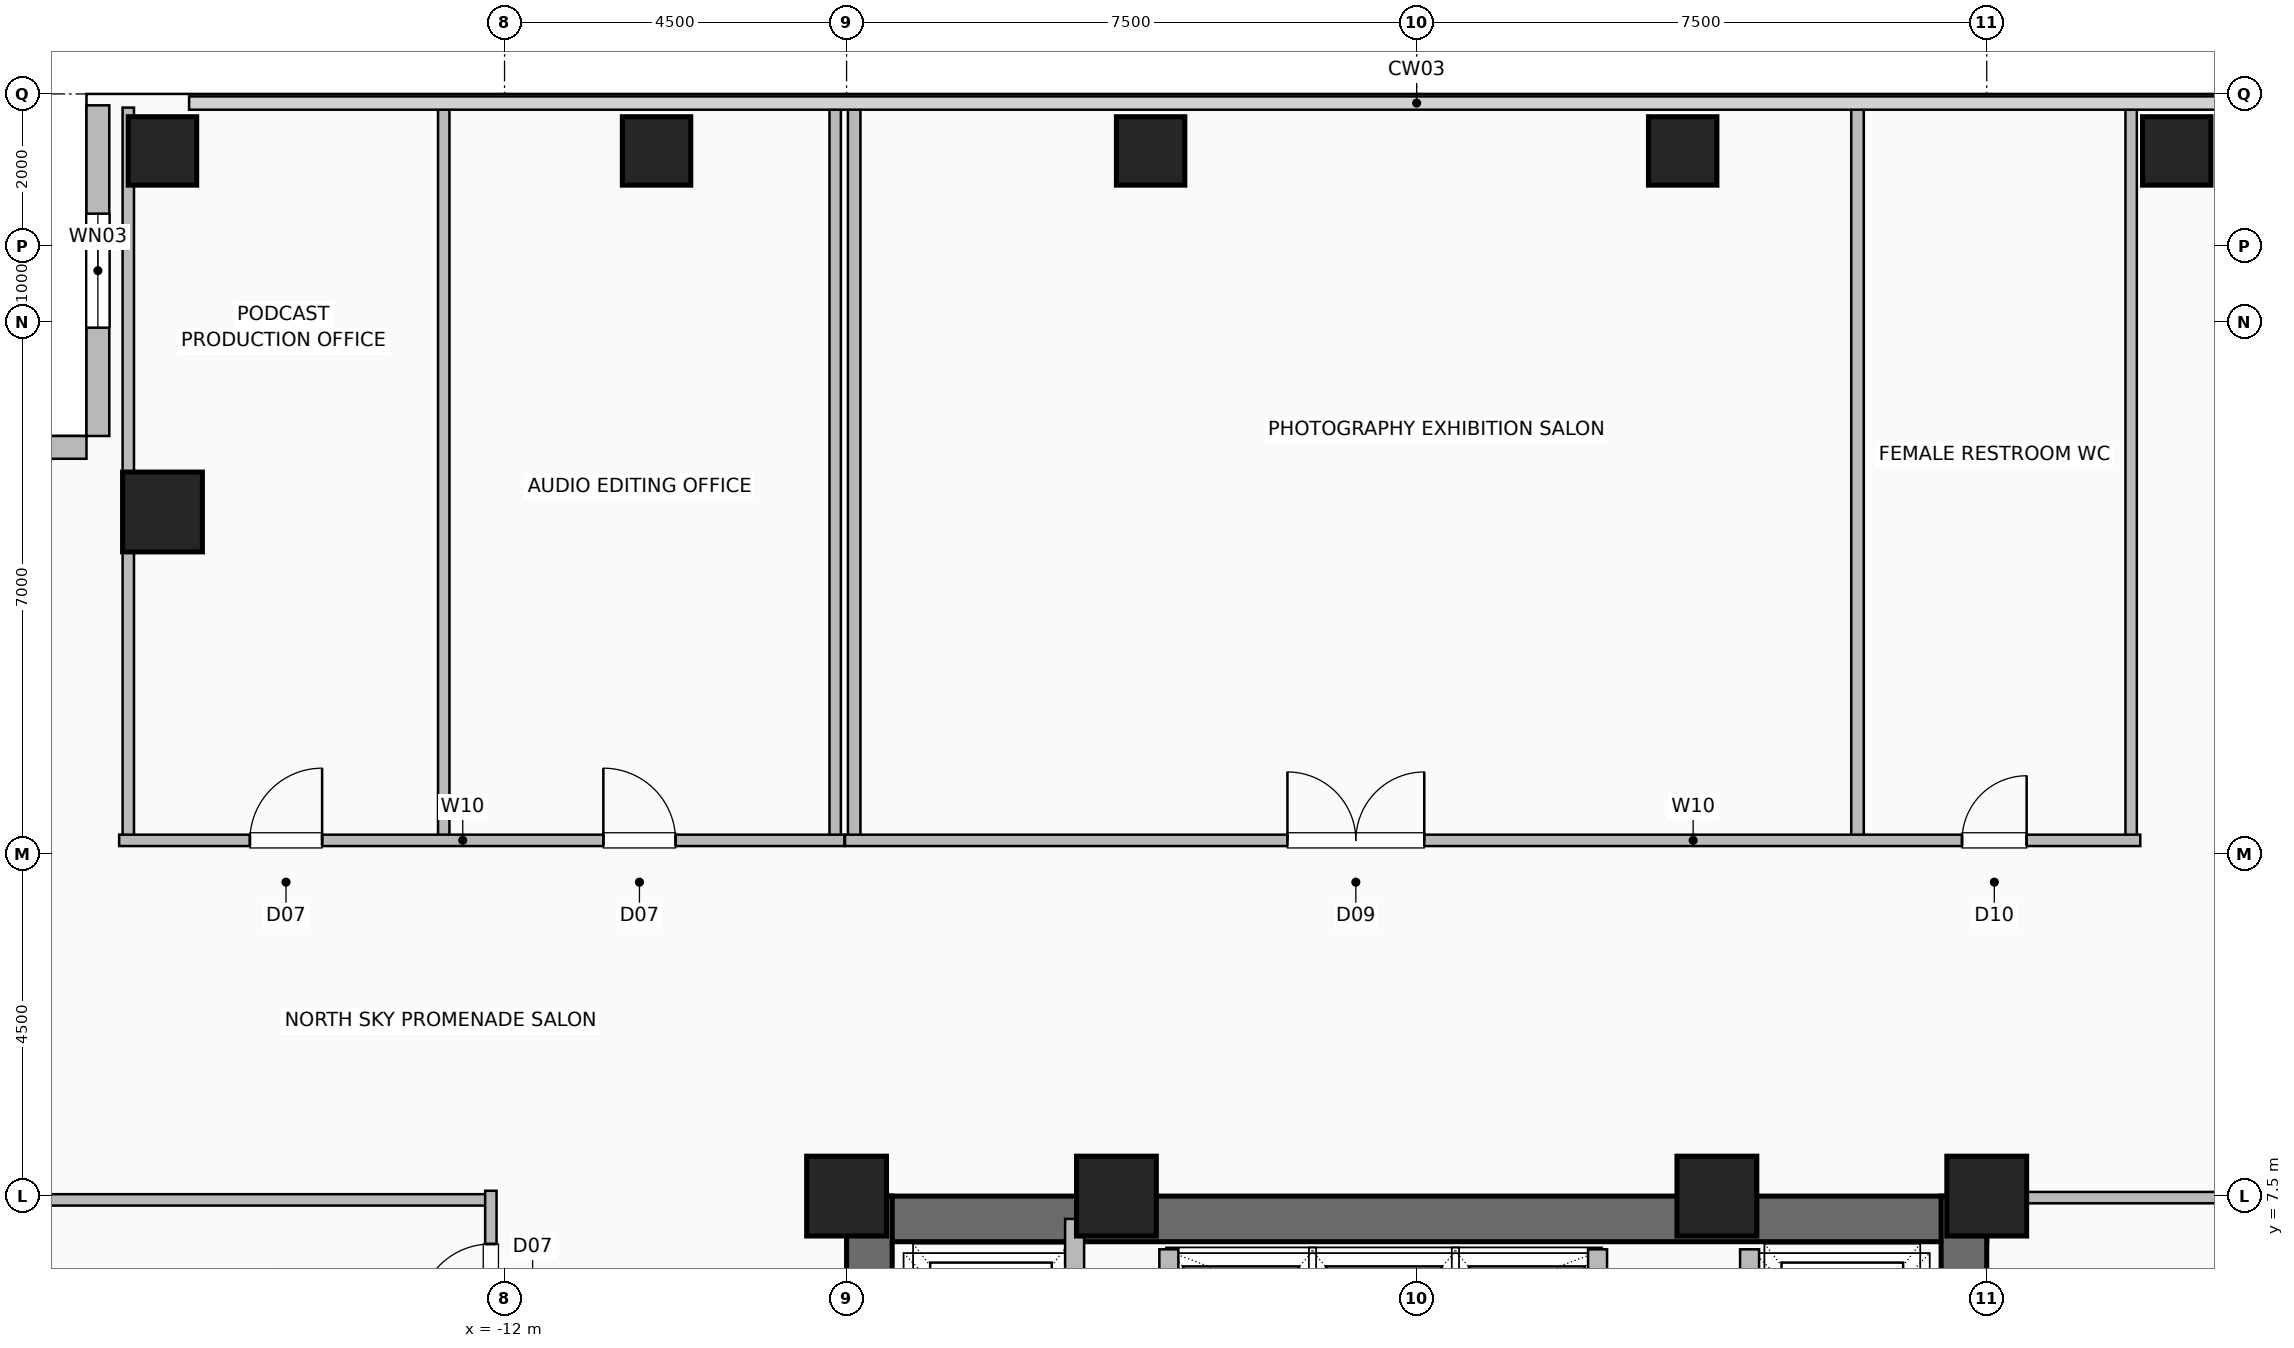
"""IFC4 building model, lengths in metres.
Left out: names, types, materials, properties, quantities, classifications, styles, units other than length and angle.
Written with IfcOpenShell. Run it as: python <this file> out.ifc"""

import sys

from ifc_helpers import new_model, si_unit, direction, frame, frame_2d, origin, origin_2d, place, context, subcontext, project, spatial, rectangle, hollow_rectangle, extrude, element, fill, save


model = new_model("IFC4")
c1 = context("Model", 3, precision=1e-05, world=origin(), true_north=direction((0.0, 1.0)))
c2 = subcontext(c1, "Body", "Model", "MODEL_VIEW")
j1 = project(units=[si_unit("LENGTHUNIT", "METRE"), si_unit("PLANEANGLEUNIT", "RADIAN")], contexts=[c1])
p1 = place(None, origin())
s1 = spatial("IfcSite", under=j1, at=p1, CompositionType="ELEMENT")
p2 = place(p1, origin())
s2 = spatial("IfcBuilding", under=s1, at=p2, CompositionType="ELEMENT")
p3 = place(p2, frame((0.0, 0.0, 140.8)))
s3 = spatial("IfcBuildingStorey", under=s2, at=p3, CompositionType="ELEMENT", Elevation=140.8)
for number, where, z_axis, x_axis in (
    (1, (7.5, 7.5, 0.0), (0.0, 0.0, 1.0), (1.0, 0.0, 0.0)),
    (2, (3.95, 7.5, 0.0), (0.0, 0.0, 1.0), (1.0, 0.0, 0.0)),
    (3, (-3.95, 7.5, 0.0), (0.0, 0.0, 1.0), (1.0, 0.0, 0.0)),
    (4, (-7.5, 7.5, 0.0), (0.0, 0.0, 1.0), (1.0, 0.0, 0.0)),
):
    element("IfcColumn", number, at=place(p3, frame(where, z_axis=z_axis, x_axis=x_axis)), inside=s3, PredefinedType="COLUMN", context=c2, shape_type="SweptSolid", body=[
        extrude(hollow_rectangle(XDim=1.05, YDim=1.05, WallThickness=0.05, at=origin_2d()), origin(), (0.0, 0.0, 1.0), 3.6),
    ])
for number, where, z_axis, x_axis in (
    (5, (-16.5, 21.25, 0.0), (0.0, 0.0, 1.0), (1.0, 0.0, 0.0)),
    (6, (-10.0, 21.25, 0.0), (0.0, 0.0, 1.0), (1.0, 0.0, 0.0)),
    (7, (-3.5, 21.25, 0.0), (0.0, 0.0, 1.0), (1.0, 0.0, 0.0)),
    (8, (3.5, 21.25, 0.0), (0.0, 0.0, 1.0), (1.0, 0.0, 0.0)),
    (9, (10.0, 21.25, 0.0), (0.0, 0.0, 1.0), (1.0, 0.0, 0.0)),
):
    element("IfcColumn", number, at=place(p3, frame(where, z_axis=z_axis, x_axis=x_axis)), inside=s3, PredefinedType="COLUMN", context=c2, shape_type="SweptSolid", body=[
        extrude(hollow_rectangle(XDim=0.9, YDim=0.9, WallThickness=0.045, at=origin_2d()), origin(), (0.0, 0.0, 1.0), 3.6),
    ])
p4 = place(p3, frame((-16.5, 16.5, 0.0), z_axis=(0.0, 0.0, 1.0), x_axis=(1.0, 0.0, 0.0)))
e10 = element("IfcColumn", 10, at=p4, inside=s3, PredefinedType="COLUMN", context=c2, shape_type="SweptSolid", body=[
    extrude(hollow_rectangle(XDim=1.05, YDim=1.05, WallThickness=0.05, at=origin_2d()), origin(), (0.0, 0.0, 1.0), 3.6),
])
p5 = place(p3, frame((-17.35, 21.85, 0.0), z_axis=(0.0, 0.0, 1.0), x_axis=(0.0, -1.0, 0.0)))
e11 = element("IfcWall", 11, at=p5, inside=s3, PredefinedType="SOLIDWALL", context=c2, shape_type="SweptSolid", body=[
    extrude(rectangle(XDim=4.35, YDim=0.3, at=frame_2d((2.175, 0.0))), origin(), (0.0, 0.0, 1.0), 3.36),
])
p6 = place(p5, frame((1.425, 0.0, 0.9)))
e12 = element("IfcOpeningElement", 12, at=p6, cuts=e11, PredefinedType="OPENING", context=c2, shape_type="SweptSolid", body=[
    extrude(rectangle(XDim=1.5, YDim=1.8, at=frame_2d((0.75, 0.9))), frame((0.0, 0.16, 0.0), z_axis=(0.0, -1.0, 0.0), x_axis=(1.0, 0.0, 0.0)), (0.0, 0.0, 1.0), 0.32),
])
p7 = place(p3, frame((-21.85, 17.35, 0.0), z_axis=(0.0, 0.0, 1.0), x_axis=(1.0, 0.0, 0.0)))
e13 = element("IfcWall", 13, at=p7, inside=s3, PredefinedType="SOLIDWALL", context=c2, shape_type="SweptSolid", body=[
    extrude(rectangle(XDim=4.35, YDim=0.3, at=frame_2d((2.175, 0.0))), origin(), (0.0, 0.0, 1.0), 3.36),
])
p8 = place(p3, frame((-7.5, 7.2, 0.0), z_axis=(0.0, 0.0, 1.0), x_axis=(1.0, 0.0, 0.0)))
e14 = element("IfcWall", 14, at=p8, inside=s3, PredefinedType="SHEAR", context=c2, shape_type="SweptSolid", body=[
    extrude(rectangle(XDim=15.0, YDim=0.6, at=frame_2d((7.5, 0.0))), origin(), (0.0, 0.0, 1.0), 3.36),
])
p9 = place(p3, frame((-7.2, -7.5, 0.0), z_axis=(0.0, 0.0, 1.0), x_axis=(0.0, 1.0, 0.0)))
e15 = element("IfcWall", 15, at=p9, inside=s3, PredefinedType="SHEAR", context=c2, shape_type="SweptSolid", body=[
    extrude(rectangle(XDim=15.0, YDim=0.6, at=frame_2d((7.5, 0.0))), origin(), (0.0, 0.0, 1.0), 3.36),
])
p10 = place(p9, frame((9.5, 0.0, 0.0)))
e16 = element("IfcOpeningElement", 16, at=p10, cuts=e15, PredefinedType="OPENING", context=c2, shape_type="SweptSolid", body=[
    extrude(rectangle(XDim=1.0, YDim=2.08, at=frame_2d((0.5, 1.04))), frame((0.0, 0.31, 0.0), z_axis=(0.0, -1.0, 0.0), x_axis=(1.0, 0.0, 0.0)), (0.0, 0.0, 1.0), 0.62),
])
p11 = place(p3, frame((7.2, -7.5, 0.0), z_axis=(0.0, 0.0, 1.0), x_axis=(0.0, 1.0, 0.0)))
e17 = element("IfcWall", 17, at=p11, inside=s3, PredefinedType="SHEAR", context=c2, shape_type="SweptSolid", body=[
    extrude(rectangle(XDim=15.0, YDim=0.6, at=frame_2d((7.5, 0.0))), origin(), (0.0, 0.0, 1.0), 3.36),
])
for number, where, z_axis, x_axis in (
    (18, (-3.26, 4.58, 0.0), (0.0, 0.0, 1.0), (0.0, 1.0, 0.0)),
    (19, (2.38, 4.58, 0.0), (0.0, 0.0, 1.0), (0.0, 1.0, 0.0)),
):
    element("IfcWall", number, at=place(p3, frame(where, z_axis=z_axis, x_axis=x_axis)), inside=s3, PredefinedType="SHEAR", context=c2, shape_type="SweptSolid", body=[
        extrude(rectangle(XDim=2.22, YDim=0.25, at=frame_2d((1.11, 0.0))), origin(), (0.0, 0.0, 1.0), 3.36),
    ])
p12 = place(p3, frame((-4.5, 4.35, 0.0), z_axis=(0.0, 0.0, 1.0), x_axis=(0.0, 1.0, 0.0)))
e20 = element("IfcWall", 20, at=p12, inside=s3, PredefinedType="SHEAR", context=c2, shape_type="SweptSolid", body=[
    extrude(rectangle(XDim=2.85, YDim=0.25, at=frame_2d((1.425, 0.0))), origin(), (0.0, 0.0, 1.0), 3.36),
])
p13 = place(p3, frame((4.38, 4.3, 0.0), z_axis=(0.0, 0.0, 1.0), x_axis=(0.0, 1.0, 0.0)))
e21 = element("IfcWall", 21, at=p13, inside=s3, PredefinedType="SHEAR", context=c2, shape_type="SweptSolid", body=[
    extrude(rectangle(XDim=2.5, YDim=0.25, at=frame_2d((1.25, 0.0))), origin(), (0.0, 0.0, 1.0), 3.36),
])
p14 = place(p13, frame((0.8, 0.0, 0.0)))
e22 = element("IfcOpeningElement", 22, at=p14, cuts=e21, PredefinedType="OPENING", context=c2, shape_type="SweptSolid", body=[
    extrude(rectangle(XDim=1.2, YDim=2.2, at=frame_2d((0.6, 1.1))), frame((0.0, 0.135, 0.0), z_axis=(0.0, -1.0, 0.0), x_axis=(1.0, 0.0, 0.0)), (0.0, 0.0, 1.0), 0.27),
])
p15 = place(p3, frame((-21.82, 7.45, 0.0), z_axis=(0.0, 0.0, 1.0), x_axis=(1.0, 0.0, 0.0)))
e23 = element("IfcWall", 23, at=p15, inside=s3, PredefinedType="PARTITIONING", context=c2, shape_type="SweptSolid", body=[
    extrude(rectangle(XDim=9.64, YDim=0.15, at=frame_2d((4.82, 0.0))), origin(), (0.0, 0.0, 1.0), 3.36),
])
p16 = place(p3, frame((-12.18, -7.57, 0.0), z_axis=(0.0, 0.0, 1.0), x_axis=(0.0, 1.0, 0.0)))
e24 = element("IfcWall", 24, at=p16, inside=s3, PredefinedType="PARTITIONING", context=c2, shape_type="SweptSolid", body=[
    extrude(rectangle(XDim=15.14, YDim=0.15, at=frame_2d((7.57, 0.0))), origin(), (0.0, 0.0, 1.0), 3.36),
])
p17 = place(p16, frame((2.17, 0.0, 0.0)))
e25 = element("IfcOpeningElement", 25, at=p17, cuts=e24, PredefinedType="OPENING", context=c2, shape_type="SweptSolid", body=[
    extrude(rectangle(XDim=0.95, YDim=2.06, at=frame_2d((0.475, 1.03))), frame((0.0, 0.085, 0.0), z_axis=(0.0, -1.0, 0.0), x_axis=(1.0, 0.0, 0.0)), (0.0, 0.0, 1.0), 0.17),
])
p18 = place(p16, frame((7.695, 0.0, 0.0)))
e26 = element("IfcOpeningElement", 26, at=p18, cuts=e24, PredefinedType="OPENING", context=c2, shape_type="SweptSolid", body=[
    extrude(rectangle(XDim=0.95, YDim=2.06, at=frame_2d((0.475, 1.03))), frame((0.0, 0.085, 0.0), z_axis=(0.0, -1.0, 0.0), x_axis=(1.0, 0.0, 0.0)), (0.0, 0.0, 1.0), 0.17),
])
p19 = place(p16, frame((11.615, 0.0, 0.0)))
e27 = element("IfcOpeningElement", 27, at=p19, cuts=e24, PredefinedType="OPENING", context=c2, shape_type="SweptSolid", body=[
    extrude(rectangle(XDim=0.85, YDim=2.05, at=frame_2d((0.425, 1.025))), frame((0.0, 0.085, 0.0), z_axis=(0.0, -1.0, 0.0), x_axis=(1.0, 0.0, 0.0)), (0.0, 0.0, 1.0), 0.17),
])
p20 = place(p16, frame((13.49, 0.0, 0.0)))
e28 = element("IfcOpeningElement", 28, at=p20, cuts=e24, PredefinedType="OPENING", context=c2, shape_type="SweptSolid", body=[
    extrude(rectangle(XDim=0.95, YDim=2.06, at=frame_2d((0.475, 1.03))), frame((0.0, 0.085, 0.0), z_axis=(0.0, -1.0, 0.0), x_axis=(1.0, 0.0, 0.0)), (0.0, 0.0, 1.0), 0.17),
])
for number, where, z_axis, x_axis in (
    (29, (-16.95, 12.18, 0.0), (0.0, 0.0, 1.0), (0.0, 1.0, 0.0)),
    (30, (-12.8, 12.18, 0.0), (0.0, 0.0, 1.0), (0.0, 1.0, 0.0)),
    (31, (-7.65, 12.18, 0.0), (0.0, 0.0, 1.0), (0.0, 1.0, 0.0)),
):
    element("IfcWall", number, at=place(p3, frame(where, z_axis=z_axis, x_axis=x_axis)), inside=s3, PredefinedType="PARTITIONING", context=c2, shape_type="SweptSolid", body=[
        extrude(rectangle(XDim=9.64, YDim=0.15, at=frame_2d((4.82, 0.0))), origin(), (0.0, 0.0, 1.0), 3.36),
    ])
p21 = place(p3, frame((-17.07, 12.18, 0.0), z_axis=(0.0, 0.0, 1.0), x_axis=(1.0, 0.0, 0.0)))
e32 = element("IfcWall", 32, at=p21, inside=s3, PredefinedType="PARTITIONING", context=c2, shape_type="SweptSolid", body=[
    extrude(rectangle(XDim=9.54, YDim=0.15, at=frame_2d((4.77, 0.0))), origin(), (0.0, 0.0, 1.0), 3.36),
])
p22 = place(p21, frame((1.72, 0.0, 0.0)))
e33 = element("IfcOpeningElement", 33, at=p22, cuts=e32, PredefinedType="OPENING", context=c2, shape_type="SweptSolid", body=[
    extrude(rectangle(XDim=0.95, YDim=2.06, at=frame_2d((0.475, 1.03))), frame((0.0, 0.085, 0.0), z_axis=(0.0, -1.0, 0.0), x_axis=(1.0, 0.0, 0.0)), (0.0, 0.0, 1.0), 0.17),
])
p23 = place(p21, frame((6.37, 0.0, 0.0)))
e34 = element("IfcOpeningElement", 34, at=p23, cuts=e32, PredefinedType="OPENING", context=c2, shape_type="SweptSolid", body=[
    extrude(rectangle(XDim=0.95, YDim=2.06, at=frame_2d((0.475, 1.03))), frame((0.0, 0.085, 0.0), z_axis=(0.0, -1.0, 0.0), x_axis=(1.0, 0.0, 0.0)), (0.0, 0.0, 1.0), 0.17),
])
for number, where, z_axis, x_axis in (
    (35, (-7.4, 12.18, 0.0), (0.0, 0.0, 1.0), (0.0, 1.0, 0.0)),
    (36, (5.8, 12.18, 0.0), (0.0, 0.0, 1.0), (0.0, 1.0, 0.0)),
):
    element("IfcWall", number, at=place(p3, frame(where, z_axis=z_axis, x_axis=x_axis)), inside=s3, PredefinedType="PLUMBINGWALL", context=c2, shape_type="SweptSolid", body=[
        extrude(rectangle(XDim=9.64, YDim=0.165, at=frame_2d((4.82, 0.0))), origin(), (0.0, 0.0, 1.0), 3.36),
    ])
p24 = place(p3, frame((9.4, 12.18, 0.0), z_axis=(0.0, 0.0, 1.0), x_axis=(0.0, 1.0, 0.0)))
e37 = element("IfcWall", 37, at=p24, inside=s3, PredefinedType="PARTITIONING", context=c2, shape_type="SweptSolid", body=[
    extrude(rectangle(XDim=9.64, YDim=0.15, at=frame_2d((4.82, 0.0))), origin(), (0.0, 0.0, 1.0), 3.36),
])
p25 = place(p3, frame((-7.52, 12.18, 0.0), z_axis=(0.0, 0.0, 1.0), x_axis=(1.0, 0.0, 0.0)))
e38 = element("IfcWall", 38, at=p25, inside=s3, PredefinedType="PARTITIONING", context=c2, shape_type="SweptSolid", body=[
    extrude(rectangle(XDim=17.04, YDim=0.15, at=frame_2d((8.52, 0.0))), origin(), (0.0, 0.0, 1.0), 3.36),
])
p26 = place(p25, frame((5.82, 0.0, 0.0)))
e39 = element("IfcOpeningElement", 39, at=p26, cuts=e38, PredefinedType="OPENING", context=c2, shape_type="SweptSolid", body=[
    extrude(rectangle(XDim=1.8, YDim=2.08, at=frame_2d((0.9, 1.04))), frame((0.0, 0.085, 0.0), z_axis=(0.0, -1.0, 0.0), x_axis=(1.0, 0.0, 0.0)), (0.0, 0.0, 1.0), 0.17),
])
p27 = place(p25, frame((14.695, 0.0, 0.0)))
e40 = element("IfcOpeningElement", 40, at=p27, cuts=e38, PredefinedType="OPENING", context=c2, shape_type="SweptSolid", body=[
    extrude(rectangle(XDim=0.85, YDim=2.05, at=frame_2d((0.425, 1.025))), frame((0.0, 0.085, 0.0), z_axis=(0.0, -1.0, 0.0), x_axis=(1.0, 0.0, 0.0)), (0.0, 0.0, 1.0), 0.17),
])
p28 = place(p3, frame((7.6, 7.48, 0.0), z_axis=(0.0, 0.0, 1.0), x_axis=(1.0, 0.0, 0.0)))
e41 = element("IfcWall", 41, at=p28, inside=s3, PredefinedType="PARTITIONING", context=c2, shape_type="SweptSolid", body=[
    extrude(rectangle(XDim=14.22, YDim=0.15, at=frame_2d((7.11, 0.0))), origin(), (0.0, 0.0, 1.0), 3.36),
])
p29 = place(p6, origin())
e42 = element("IfcWindow", 42, at=p29, inside=s3, PartitioningType="SINGLE_PANEL", PredefinedType="WINDOW", context=c2, shape_type="SweptSolid", body=[
    extrude(rectangle(XDim=1.5, YDim=1.8, at=frame_2d((0.75, 0.9))), frame((0.0, 0.03, 0.0), z_axis=(0.0, -1.0, 0.0), x_axis=(1.0, 0.0, 0.0)), (0.0, 0.0, 1.0), 0.06),
])
fill(e12, e42)
p30 = place(p20, origin())
e43 = element("IfcDoor", 43, at=p30, inside=s3, OperationType="SINGLE_SWING_LEFT", PredefinedType="DOOR", context=c2, shape_type="SweptSolid", body=[
    extrude(rectangle(XDim=0.95, YDim=2.06, at=frame_2d((0.475, 1.03))), frame((0.0, 0.025, 0.0), z_axis=(0.0, -1.0, 0.0), x_axis=(1.0, 0.0, 0.0)), (0.0, 0.0, 1.0), 0.05),
])
fill(e28, e43)
p31 = place(p22, origin())
e44 = element("IfcDoor", 44, at=p31, inside=s3, OperationType="SINGLE_SWING_RIGHT", PredefinedType="DOOR", context=c2, shape_type="SweptSolid", body=[
    extrude(rectangle(XDim=0.95, YDim=2.06, at=frame_2d((0.475, 1.03))), frame((0.0, 0.025, 0.0), z_axis=(0.0, -1.0, 0.0), x_axis=(1.0, 0.0, 0.0)), (0.0, 0.0, 1.0), 0.05),
])
fill(e33, e44)
p32 = place(p23, origin())
e45 = element("IfcDoor", 45, at=p32, inside=s3, OperationType="SINGLE_SWING_LEFT", PredefinedType="DOOR", context=c2, shape_type="SweptSolid", body=[
    extrude(rectangle(XDim=0.95, YDim=2.06, at=frame_2d((0.475, 1.03))), frame((0.0, 0.025, 0.0), z_axis=(0.0, -1.0, 0.0), x_axis=(1.0, 0.0, 0.0)), (0.0, 0.0, 1.0), 0.05),
])
fill(e34, e45)
p33 = place(p26, origin())
e46 = element("IfcDoor", 46, at=p33, inside=s3, OperationType="DOUBLE_DOOR_SINGLE_SWING", PredefinedType="DOOR", context=c2, shape_type="SweptSolid", body=[
    extrude(rectangle(XDim=1.8, YDim=2.08, at=frame_2d((0.9, 1.04))), frame((0.0, 0.025, 0.0), z_axis=(0.0, -1.0, 0.0), x_axis=(1.0, 0.0, 0.0)), (0.0, 0.0, 1.0), 0.05),
])
fill(e39, e46)
p34 = place(p27, origin())
e47 = element("IfcDoor", 47, at=p34, inside=s3, OperationType="SINGLE_SWING_RIGHT", PredefinedType="DOOR", context=c2, shape_type="SweptSolid", body=[
    extrude(rectangle(XDim=0.85, YDim=2.05, at=frame_2d((0.425, 1.025))), frame((0.0, 0.025, 0.0), z_axis=(0.0, -1.0, 0.0), x_axis=(1.0, 0.0, 0.0)), (0.0, 0.0, 1.0), 0.05),
])
fill(e40, e47)
save(model, sys.argv[1])
